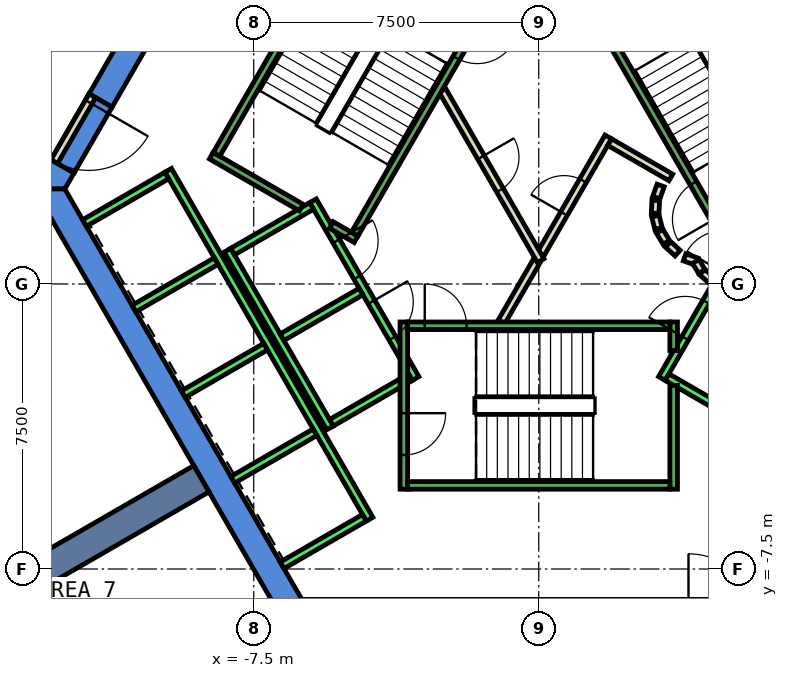
"""IFC4 building model, lengths in metres.
Left out: names, types, materials, properties, quantities, classifications, styles, units other than length and angle.
Written with IfcOpenShell. Run it as: python <this file> out.ifc"""

import sys

from ifc_helpers import new_model, si_unit, direction, frame, frame_2d, origin, place, context, subcontext, project, spatial, polyline, rectangle, outline, extrude, element, fill, save


model = new_model("IFC4")
c1 = context("Model", 3, precision=1e-05, world=origin(), true_north=direction((0.0, 1.0)))
c2 = subcontext(c1, "Body", "Model", "MODEL_VIEW")
j1 = project(units=[si_unit("LENGTHUNIT", "METRE"), si_unit("PLANEANGLEUNIT", "RADIAN")], contexts=[c1])
p1 = place(None, origin())
s1 = spatial("IfcSite", under=j1, at=p1, CompositionType="ELEMENT")
p2 = place(p1, origin())
s2 = spatial("IfcBuilding", under=s1, at=p2, CompositionType="ELEMENT")
p3 = place(p2, frame((0.0, 0.0, 189.8)))
s3 = spatial("IfcBuildingStorey", under=s2, at=p3, CompositionType="ELEMENT", Elevation=189.8)
p4 = place(p3, frame((0.0, 0.0, -0.6)))
e1 = element("IfcWall", 1, at=p4, inside=s3, PredefinedType="SHEAR", context=c2, shape_type="SweptSolid", body=[
    extrude(outline(polyline([(-11.834, 5.002), (-11.228, 4.652), (-6.235, 13.3), (-6.64, 14.0), (-11.834, 5.002)])), origin(), (0.0, 0.0, 1.0), 4.4),
])
p5 = place(p3, frame((0.0, 0.0, -0.6)))
e2 = element("IfcWall", 2, at=p5, inside=s3, PredefinedType="SHEAR", context=c2, shape_type="SweptSolid", body=[
    extrude(outline(polyline([(-12.228, 2.92), (-12.834, 3.27), (-13.279, 2.5), (-12.471, 2.5), (-12.228, 2.92)])), origin(), (0.0, 0.0, 1.0), 4.4),
])
p6 = place(p3, frame((0.0, 0.0, 3.6)))
e3 = element("IfcWall", 3, at=p6, inside=s3, PredefinedType="SHEAR", context=c2, shape_type="SweptSolid", body=[
    extrude(outline(polyline([(-12.834, 3.27), (-12.228, 2.92), (-11.228, 4.652), (-11.834, 5.002), (-12.834, 3.27)])), origin(), (0.0, 0.0, 1.0), 0.2),
])
p7 = place(p3, frame((0.0, 0.0, -0.6)))
e4 = element("IfcWall", 4, at=p7, inside=s3, PredefinedType="SHEAR", context=c2, shape_type="SweptSolid", body=[
    extrude(outline(polyline([(-13.279, 2.5), (-6.64, -9.0), (-6.235, -8.3), (-12.471, 2.5), (-13.279, 2.5)])), origin(), (0.0, 0.0, 1.0), 4.4),
])
p8 = place(p3, frame((-8.877, -5.125, -0.6), z_axis=(0.0, 0.0, 1.0), x_axis=(-0.866017533419, -0.500013631625, 0.0)))
e5 = element("IfcWall", 5, at=p8, inside=s3, PredefinedType="SHEAR", context=c2, shape_type="SweptSolid", body=[
    extrude(rectangle(XDim=9.0, YDim=0.8, at=frame_2d((4.5, 0.0))), origin(), (0.0, 0.0, 1.0), 4.4),
])
p9 = place(p3, frame((-15.905, 4.412, 0.0), z_axis=(0.0, 0.0, 1.0), x_axis=(0.5000098125, 0.866019738461, 0.0)))
e6 = element("IfcWall", 6, at=p9, inside=s3, PredefinedType="PARTITIONING", context=c2, shape_type="SweptSolid", body=[
    extrude(rectangle(XDim=8.188, YDim=0.2, at=frame_2d((4.094, 0.0))), origin(), (0.0, 0.0, 1.0), 3.8),
])
p10 = place(p9, frame((3.594, 0.0, 0.0)))
e7 = element("IfcOpeningElement", 7, at=p10, cuts=e6, PredefinedType="OPENING", context=c2, shape_type="SweptSolid", body=[
    extrude(rectangle(XDim=1.0, YDim=2.1, at=frame_2d((0.5, 1.05))), frame((0.0, 0.11, 0.0), z_axis=(0.0, -1.0, 0.0), x_axis=(1.0, 0.0, 0.0)), (0.0, 0.0, 1.0), 0.22),
])
p11 = place(p3, frame((-0.982, -1.0, 0.0), z_axis=(0.0, 0.0, 1.0), x_axis=(0.50024047865, 0.865886518847, 0.0)))
e8 = element("IfcWall", 8, at=p11, inside=s3, PredefinedType="PARTITIONING", context=c2, shape_type="SweptSolid", body=[
    extrude(rectangle(XDim=1.863, YDim=0.2, at=frame_2d((0.931, 0.0))), origin(), (0.0, 0.0, 1.0), 3.8),
])
p12 = place(p3, frame((0.05, 0.787, 0.0), z_axis=(0.0, 0.0, 1.0), x_axis=(0.499954076797, 0.866051915934, 0.0)))
e9 = element("IfcWall", 9, at=p12, inside=s3, PredefinedType="PARTITIONING", context=c2, shape_type="SweptSolid", body=[
    extrude(rectangle(XDim=3.558, YDim=0.2, at=frame_2d((1.779, 0.0))), origin(), (0.0, 0.0, 1.0), 3.8),
])
p13 = place(p12, frame((1.229, 0.0, 0.0)))
e10 = element("IfcOpeningElement", 10, at=p13, cuts=e9, PredefinedType="OPENING", context=c2, shape_type="SweptSolid", body=[
    extrude(rectangle(XDim=1.0, YDim=2.1, at=frame_2d((0.5, 1.05))), frame((0.0, 0.11, 0.0), z_axis=(0.0, -1.0, 0.0), x_axis=(1.0, 0.0, 0.0)), (0.0, 0.0, 1.0), 0.22),
])
p14 = place(p3, frame((1.866, 3.732, 0.0), z_axis=(0.0, 0.0, 1.0), x_axis=(0.866043361281, -0.499968895414, 0.0)))
e11 = element("IfcWall", 11, at=p14, inside=s3, PredefinedType="PARTITIONING", context=c2, shape_type="SweptSolid", body=[
    extrude(rectangle(XDim=1.858, YDim=0.2, at=frame_2d((0.929, 0.0))), origin(), (0.0, 0.0, 1.0), 3.8),
])
p15 = place(p3, frame((3.208, 2.592, 0.0), z_axis=(0.0, 0.0, 1.0), x_axis=(-0.337388820924, -0.941365382578, 0.0)))
e12 = element("IfcWall", 12, at=p15, inside=s3, PredefinedType="PARTITIONING", context=c2, shape_type="SweptSolid", body=[
    extrude(rectangle(XDim=0.338, YDim=0.2, at=frame_2d((0.169, 0.0))), origin(), (0.0, 0.0, 1.0), 3.8),
])
p16 = place(p3, frame((3.079, 2.199, 0.0), z_axis=(0.0, 0.0, 1.0), x_axis=(-0.047771483479, -0.998858290933, 0.0)))
e13 = element("IfcWall", 13, at=p16, inside=s3, PredefinedType="PARTITIONING", context=c2, shape_type="SweptSolid", body=[
    extrude(rectangle(XDim=0.337, YDim=0.2, at=frame_2d((0.169, 0.0))), origin(), (0.0, 0.0, 1.0), 3.8),
])
p17 = place(p3, frame((3.07, 1.786, 0.0), z_axis=(0.0, 0.0, 1.0), x_axis=(0.242705583207, -0.970099994784, 0.0)))
e14 = element("IfcWall", 14, at=p17, inside=s3, PredefinedType="PARTITIONING", context=c2, shape_type="SweptSolid", body=[
    extrude(rectangle(XDim=0.338, YDim=0.2, at=frame_2d((0.169, 0.0))), origin(), (0.0, 0.0, 1.0), 3.8),
])
for number, where, z_axis, x_axis in (
    (15, (3.182, 1.388, 0.0), (0.0, 0.0, 1.0), (0.512, -0.859, 0.0)),
    (16, (3.404, 1.039, 0.0), (0.0, 0.0, 1.0), (0.74, -0.672, 0.0)),
):
    element("IfcWall", number, at=place(p3, frame(where, z_axis=z_axis, x_axis=x_axis)), inside=s3, PredefinedType="PARTITIONING", context=c2, shape_type="SweptSolid", body=[
        extrude(rectangle(XDim=0.338, YDim=0.2, at=frame_2d((0.169, 0.0))), origin(), (0.0, 0.0, 1.0), 3.8),
    ])
p18 = place(p3, frame((3.838, 0.702, 0.0), z_axis=(0.0, 0.0, 1.0), x_axis=(0.941035081519, -0.338308993895, 0.0)))
e17 = element("IfcWall", 17, at=p18, inside=s3, PredefinedType="PARTITIONING", context=c2, shape_type="SweptSolid", body=[
    extrude(rectangle(XDim=0.337, YDim=0.2, at=frame_2d((0.168, 0.0))), origin(), (0.0, 0.0, 1.0), 3.8),
])
p19 = place(p3, frame((4.132, 0.593, 0.0), z_axis=(0.0, 0.0, 1.0), x_axis=(0.513561617048, -0.858052717201, 0.0)))
e18 = element("IfcWall", 18, at=p19, inside=s3, PredefinedType="PARTITIONING", context=c2, shape_type="SweptSolid", body=[
    extrude(rectangle(XDim=0.308, YDim=0.2, at=frame_2d((0.154, 0.0))), origin(), (0.0, 0.0, 1.0), 3.8),
])
p20 = place(p3, frame((4.301, 0.315, 0.0), z_axis=(0.0, 0.0, 1.0), x_axis=(0.741798017506, -0.670623367639, 0.0)))
e19 = element("IfcWall", 19, at=p20, inside=s3, PredefinedType="PARTITIONING", context=c2, shape_type="SweptSolid", body=[
    extrude(rectangle(XDim=0.309, YDim=0.2, at=frame_2d((0.154, 0.0))), origin(), (0.0, 0.0, 1.0), 3.8),
])
p21 = place(p3, frame((-2.54, 5.1, 0.0), z_axis=(0.0, 0.0, 1.0), x_axis=(0.499925051871, -0.866068670783, 0.0)))
e20 = element("IfcWall", 20, at=p21, inside=s3, PredefinedType="PARTITIONING", context=c2, shape_type="SweptSolid", body=[
    extrude(rectangle(XDim=5.181, YDim=0.2, at=frame_2d((2.59, 0.0))), origin(), (0.0, 0.0, 1.0), 3.8),
])
p22 = place(p21, frame((2.04, 0.0, 0.0)))
e21 = element("IfcOpeningElement", 21, at=p22, cuts=e20, PredefinedType="OPENING", context=c2, shape_type="SweptSolid", body=[
    extrude(rectangle(XDim=1.0, YDim=2.1, at=frame_2d((0.5, 1.05))), frame((0.0, 0.11, 0.0), z_axis=(0.0, -1.0, 0.0), x_axis=(1.0, 0.0, 0.0)), (0.0, 0.0, 1.0), 0.22),
])
p23 = place(p3, frame((-11.747, 4.952, 0.0), z_axis=(0.0, 0.0, 1.0), x_axis=(-0.50002537861, -0.866010750942, 0.0)))
e22 = element("IfcWall", 22, at=p23, inside=s3, PredefinedType="PARTITIONING", context=c2, shape_type="SweptSolid", body=[
    extrude(rectangle(XDim=2.0, YDim=0.2, at=frame_2d((1.0, 0.0))), origin(), (0.0, 0.0, 1.0), 2.4),
])
p24 = place(p23, frame((0.19, 0.0, 0.0)))
e23 = element("IfcOpeningElement", 23, at=p24, cuts=e22, PredefinedType="OPENING", context=c2, shape_type="SweptSolid", body=[
    extrude(rectangle(XDim=1.8, YDim=2.1, at=frame_2d((0.9, 1.05))), frame((0.0, 0.11, 0.0), z_axis=(0.0, -1.0, 0.0), x_axis=(1.0, 0.0, 0.0)), (0.0, 0.0, 1.0), 0.22),
])
p25 = place(p3, frame((-5.94, 2.188, 0.0), z_axis=(0.0, 0.0, 1.0), x_axis=(0.500034260056, -0.866005622828, 0.0)))
e24 = element("IfcWall", 24, at=p25, inside=s3, PredefinedType="STANDARD", context=c2, shape_type="SweptSolid", body=[
    extrude(rectangle(XDim=5.399, YDim=0.2, at=frame_2d((2.7, 0.0))), origin(), (0.0, 0.0, 1.0), 3.8),
])
p26 = place(p25, frame((3.075, 0.0, 0.0)))
e25 = element("IfcOpeningElement", 25, at=p26, cuts=e24, PredefinedType="OPENING", context=c2, shape_type="SweptSolid", body=[
    extrude(rectangle(XDim=1.1, YDim=2.1, at=frame_2d((0.55, 1.05))), frame((0.0, 0.11, 0.0), z_axis=(0.0, -1.0, 0.0), x_axis=(1.0, 0.0, 0.0)), (0.0, 0.0, 1.0), 0.22),
])
p27 = place(p25, frame((1.225, 0.0, 0.0)))
e26 = element("IfcOpeningElement", 26, at=p27, cuts=e24, PredefinedType="OPENING", context=c2, shape_type="SweptSolid", body=[
    extrude(rectangle(XDim=1.1, YDim=2.1, at=frame_2d((0.55, 1.05))), frame((0.0, 0.11, 0.0), z_axis=(0.0, -1.0, 0.0), x_axis=(1.0, 0.0, 0.0)), (0.0, 0.0, 1.0), 0.22),
])
p28 = place(p3, frame((-8.192, 0.888, 0.0), z_axis=(0.0, 0.0, 1.0), x_axis=(0.500034260056, -0.866005622828, 0.0)))
e27 = element("IfcWall", 27, at=p28, inside=s3, PredefinedType="STANDARD", context=c2, shape_type="SweptSolid", body=[
    extrude(rectangle(XDim=5.399, YDim=0.2, at=frame_2d((2.7, 0.0))), origin(), (0.0, 0.0, 1.0), 3.8),
])
for number, where, z_axis, x_axis in (
    (28, (-5.977, 2.052, 0.0), (0.0, 0.0, 1.0), (-0.866, -0.5, 0.0)),
    (29, (-4.677, -0.2, 0.0), (0.0, 0.0, 1.0), (-0.866, -0.5, 0.0)),
):
    element("IfcWall", number, at=place(p3, frame(where, z_axis=z_axis, x_axis=x_axis)), inside=s3, PredefinedType="STANDARD", context=c2, shape_type="SweptSolid", body=[
        extrude(rectangle(XDim=2.399, YDim=0.2, at=frame_2d((1.2, 0.0))), origin(), (0.0, 0.0, 1.0), 3.8),
    ])
p29 = place(p3, frame((-3.377, -2.452, 0.0), z_axis=(0.0, 0.0, 1.0), x_axis=(-0.865955154139, -0.50012165622, 0.0)))
e30 = element("IfcWall", 30, at=p29, inside=s3, PredefinedType="STANDARD", context=c2, shape_type="SweptSolid", body=[
    extrude(rectangle(XDim=2.4, YDim=0.2, at=frame_2d((1.2, 0.0))), origin(), (0.0, 0.0, 1.0), 3.8),
])
p30 = place(p3, frame((-9.751, 2.99, 0.0), z_axis=(0.0, 0.0, 1.0), x_axis=(0.50000090737, -0.866024879913, 0.0)))
e31 = element("IfcWall", 31, at=p30, inside=s3, PredefinedType="STANDARD", context=c2, shape_type="SweptSolid", body=[
    extrude(rectangle(XDim=10.6, YDim=0.2, at=frame_2d((5.3, 0.0))), origin(), (0.0, 0.0, 1.0), 3.8),
])
p31 = place(p3, frame((-9.788, 2.853, 0.0), z_axis=(0.0, 0.0, 1.0), x_axis=(-0.865998541277, -0.500046524342, 0.0)))
e32 = element("IfcWall", 32, at=p31, inside=s3, PredefinedType="STANDARD", context=c2, shape_type="SweptSolid", body=[
    extrude(rectangle(XDim=2.5, YDim=0.2, at=frame_2d((1.25, 0.0))), origin(), (0.0, 0.0, 1.0), 3.8),
])
for number, where, z_axis, x_axis in (
    (33, (-8.488, 0.602, 0.0), (0.0, 0.0, 1.0), (-0.866, -0.5, 0.0)),
    (34, (-7.188, -1.65, 0.0), (0.0, 0.0, 1.0), (-0.866, -0.5, 0.0)),
    (35, (-5.888, -3.902, 0.0), (0.0, 0.0, 1.0), (-0.866, -0.5, 0.0)),
    (36, (-4.588, -6.153, 0.0), (0.0, 0.0, 1.0), (-0.866, -0.5, 0.0)),
):
    element("IfcWall", number, at=place(p3, frame(where, z_axis=z_axis, x_axis=x_axis)), inside=s3, PredefinedType="STANDARD", context=c2, shape_type="SweptSolid", body=[
        extrude(rectangle(XDim=2.5, YDim=0.2, at=frame_2d((1.25, 0.0))), origin(), (0.0, 0.0, 1.0), 3.8),
    ])
p32 = place(p3, frame((3.24, -2.488, 0.0), z_axis=(0.0, 0.0, 1.0), x_axis=(0.500034260056, 0.866005622828, 0.0)))
e37 = element("IfcWall", 37, at=p32, inside=s3, PredefinedType="STANDARD", context=c2, shape_type="SweptSolid", body=[
    extrude(rectangle(XDim=5.399, YDim=0.2, at=frame_2d((2.7, 0.0))), origin(), (0.0, 0.0, 1.0), 3.8),
])
p33 = place(p32, frame((3.225, 0.0, 0.0)))
e38 = element("IfcOpeningElement", 38, at=p33, cuts=e37, PredefinedType="OPENING", context=c2, shape_type="SweptSolid", body=[
    extrude(rectangle(XDim=1.1, YDim=2.1, at=frame_2d((0.55, 1.05))), frame((0.0, 0.11, 0.0), z_axis=(0.0, -1.0, 0.0), x_axis=(1.0, 0.0, 0.0)), (0.0, 0.0, 1.0), 0.22),
])
p34 = place(p32, frame((1.225, 0.0, 0.0)))
e39 = element("IfcOpeningElement", 39, at=p34, cuts=e37, PredefinedType="OPENING", context=c2, shape_type="SweptSolid", body=[
    extrude(rectangle(XDim=1.1, YDim=2.1, at=frame_2d((0.55, 1.05))), frame((0.0, 0.11, 0.0), z_axis=(0.0, -1.0, 0.0), x_axis=(1.0, 0.0, 0.0)), (0.0, 0.0, 1.0), 0.22),
])
p35 = place(p3, frame((3.377, -2.452, 0.0), z_axis=(0.0, 0.0, 1.0), x_axis=(0.865955154139, -0.50012165622, 0.0)))
e40 = element("IfcWall", 40, at=p35, inside=s3, PredefinedType="STANDARD", context=c2, shape_type="SweptSolid", body=[
    extrude(rectangle(XDim=2.4, YDim=0.2, at=frame_2d((1.2, 0.0))), origin(), (0.0, 0.0, 1.0), 3.8),
])
p36 = place(p3, frame((-3.55, -1.0, 0.0), z_axis=(0.0, 0.0, 1.0), x_axis=(0.0, -1.0, 0.0)))
e41 = element("IfcWall", 41, at=p36, inside=s3, PredefinedType="STANDARD", context=c2, shape_type="SweptSolid", body=[
    extrude(rectangle(XDim=4.4, YDim=0.2, at=frame_2d((2.2, 0.0))), origin(), (0.0, 0.0, 1.0), 3.8),
])
p37 = place(p36, frame((2.4, 0.0, 0.0)))
e42 = element("IfcOpeningElement", 42, at=p37, cuts=e41, PredefinedType="OPENING", context=c2, shape_type="SweptSolid", body=[
    extrude(rectangle(XDim=1.1, YDim=2.2, at=frame_2d((0.55, 1.1))), frame((0.0, 0.11, 0.0), z_axis=(0.0, -1.0, 0.0), x_axis=(1.0, 0.0, 0.0)), (0.0, 0.0, 1.0), 0.22),
])
p38 = place(p3, frame((3.55, -2.667, 0.0), z_axis=(0.0, 0.0, 1.0), x_axis=(0.0, -1.0, 0.0)))
e43 = element("IfcWall", 43, at=p38, inside=s3, PredefinedType="STANDARD", context=c2, shape_type="SweptSolid", body=[
    extrude(rectangle(XDim=2.733, YDim=0.2, at=frame_2d((1.366, 0.0))), origin(), (0.0, 0.0, 1.0), 3.8),
])
p39 = place(p3, frame((3.55, -1.0, 0.0), z_axis=(0.0, 0.0, 1.0), x_axis=(0.0, -1.0, 0.0)))
e44 = element("IfcWall", 44, at=p39, inside=s3, PredefinedType="STANDARD", context=c2, shape_type="SweptSolid", body=[
    extrude(rectangle(XDim=0.751, YDim=0.2, at=frame_2d((0.375, 0.0))), origin(), (0.0, 0.0, 1.0), 3.8),
])
p40 = place(p3, frame((-3.45, -1.1, 0.0), z_axis=(0.0, 0.0, 1.0), x_axis=(1.0, 0.0, 0.0)))
e45 = element("IfcWall", 45, at=p40, inside=s3, PredefinedType="STANDARD", context=c2, shape_type="SweptSolid", body=[
    extrude(rectangle(XDim=6.9, YDim=0.2, at=frame_2d((3.45, 0.0))), origin(), (0.0, 0.0, 1.0), 3.8),
])
p41 = place(p40, frame((0.45, 0.0, 0.0)))
e46 = element("IfcOpeningElement", 46, at=p41, cuts=e45, PredefinedType="OPENING", context=c2, shape_type="SweptSolid", body=[
    extrude(rectangle(XDim=1.1, YDim=2.2, at=frame_2d((0.55, 1.1))), frame((0.0, 0.11, 0.0), z_axis=(0.0, -1.0, 0.0), x_axis=(1.0, 0.0, 0.0)), (0.0, 0.0, 1.0), 0.22),
])
p42 = place(p3, frame((-3.45, -5.3, 0.0), z_axis=(0.0, 0.0, 1.0), x_axis=(1.0, 0.0, 0.0)))
e47 = element("IfcWall", 47, at=p42, inside=s3, PredefinedType="STANDARD", context=c2, shape_type="SweptSolid", body=[
    extrude(rectangle(XDim=6.9, YDim=0.2, at=frame_2d((3.45, 0.0))), origin(), (0.0, 0.0, 1.0), 3.8),
])
p43 = place(p3, frame((4.843, 1.312, 0.0), z_axis=(0.0, 0.0, 1.0), x_axis=(-0.499963383562, 0.866046543262, 0.0)))
e48 = element("IfcWall", 48, at=p43, inside=s3, PredefinedType="STANDARD", context=c2, shape_type="SweptSolid", body=[
    extrude(rectangle(XDim=6.9, YDim=0.2, at=frame_2d((3.45, 0.0))), origin(), (0.0, 0.0, 1.0), 3.8),
])
p44 = place(p43, frame((0.45, 0.0, 0.0)))
e49 = element("IfcOpeningElement", 49, at=p44, cuts=e48, PredefinedType="OPENING", context=c2, shape_type="SweptSolid", body=[
    extrude(rectangle(XDim=1.1, YDim=2.2, at=frame_2d((0.55, 1.1))), frame((0.0, 0.11, 0.0), z_axis=(0.0, -1.0, 0.0), x_axis=(1.0, 0.0, 0.0)), (0.0, 0.0, 1.0), 0.22),
])
p45 = place(p3, frame((-6.25, 2.01, 0.0), z_axis=(0.0, 0.0, 1.0), x_axis=(-0.86611865017, 0.499838457731, 0.0)))
e50 = element("IfcWall", 50, at=p45, inside=s3, PredefinedType="STANDARD", context=c2, shape_type="SweptSolid", body=[
    extrude(rectangle(XDim=2.733, YDim=0.2, at=frame_2d((1.366, 0.0))), origin(), (0.0, 0.0, 1.0), 3.8),
])
p46 = place(p3, frame((-4.806, 1.176, 0.0), z_axis=(0.0, 0.0, 1.0), x_axis=(-0.866558586415, 0.499075361355, 0.0)))
e51 = element("IfcWall", 51, at=p46, inside=s3, PredefinedType="STANDARD", context=c2, shape_type="SweptSolid", body=[
    extrude(rectangle(XDim=0.751, YDim=0.2, at=frame_2d((0.376, 0.0))), origin(), (0.0, 0.0, 1.0), 3.8),
])
p47 = place(p3, frame((-1.393, 7.288, 0.0), z_axis=(0.0, 0.0, 1.0), x_axis=(-0.499963383562, -0.866046543262, 0.0)))
e52 = element("IfcWall", 52, at=p47, inside=s3, PredefinedType="STANDARD", context=c2, shape_type="SweptSolid", body=[
    extrude(rectangle(XDim=6.9, YDim=0.2, at=frame_2d((3.45, 0.0))), origin(), (0.0, 0.0, 1.0), 3.8),
])
p48 = place(p47, frame((0.45, 0.0, 0.0)))
e53 = element("IfcOpeningElement", 53, at=p48, cuts=e52, PredefinedType="OPENING", context=c2, shape_type="SweptSolid", body=[
    extrude(rectangle(XDim=1.1, YDim=2.2, at=frame_2d((0.55, 1.1))), frame((0.0, 0.11, 0.0), z_axis=(0.0, -1.0, 0.0), x_axis=(1.0, 0.0, 0.0)), (0.0, 0.0, 1.0), 0.22),
])
p49 = place(p3, frame((-5.03, 9.388, 0.0), z_axis=(0.0, 0.0, 1.0), x_axis=(-0.499978703459, -0.866037698999, 0.0)))
e54 = element("IfcWall", 54, at=p49, inside=s3, PredefinedType="STANDARD", context=c2, shape_type="SweptSolid", body=[
    extrude(rectangle(XDim=6.9, YDim=0.2, at=frame_2d((3.45, 0.0))), origin(), (0.0, 0.0, 1.0), 3.8),
])
p50 = place(p13, origin())
e55 = element("IfcDoor", 55, at=p50, inside=s3, OperationType="SINGLE_SWING_RIGHT", PredefinedType="DOOR", context=c2, shape_type="SweptSolid", body=[
    extrude(rectangle(XDim=1.0, YDim=2.1, at=frame_2d((0.5, 1.05))), frame((0.0, 0.025, 0.0), z_axis=(0.0, -1.0, 0.0), x_axis=(1.0, 0.0, 0.0)), (0.0, 0.0, 1.0), 0.05),
])
fill(e10, e55)
p51 = place(p22, origin())
e56 = element("IfcDoor", 56, at=p51, inside=s3, OperationType="SINGLE_SWING_RIGHT", PredefinedType="DOOR", context=c2, shape_type="SweptSolid", body=[
    extrude(rectangle(XDim=1.0, YDim=2.1, at=frame_2d((0.5, 1.05))), frame((0.0, 0.025, 0.0), z_axis=(0.0, -1.0, 0.0), x_axis=(1.0, 0.0, 0.0)), (0.0, 0.0, 1.0), 0.05),
])
fill(e21, e56)
p52 = place(p24, origin())
e57 = element("IfcDoor", 57, at=p52, inside=s3, OperationType="DOUBLE_DOOR_SINGLE_SWING", PredefinedType="DOOR", context=c2, shape_type="SweptSolid", body=[
    extrude(rectangle(XDim=1.8, YDim=2.1, at=frame_2d((0.9, 1.05))), frame((0.0, 0.025, 0.0), z_axis=(0.0, -1.0, 0.0), x_axis=(1.0, 0.0, 0.0)), (0.0, 0.0, 1.0), 0.05),
])
fill(e23, e57)
p53 = place(p26, origin())
e58 = element("IfcDoor", 58, at=p53, inside=s3, OperationType="SLIDING_TO_LEFT", PredefinedType="DOOR", context=c2, shape_type="SweptSolid", body=[
    extrude(rectangle(XDim=1.1, YDim=2.1, at=frame_2d((0.55, 1.05))), frame((0.0, 0.025, 0.0), z_axis=(0.0, -1.0, 0.0), x_axis=(1.0, 0.0, 0.0)), (0.0, 0.0, 1.0), 0.05),
])
fill(e25, e58)
p54 = place(p34, origin())
e59 = element("IfcDoor", 59, at=p54, inside=s3, OperationType="SLIDING_TO_LEFT", PredefinedType="DOOR", context=c2, shape_type="SweptSolid", body=[
    extrude(rectangle(XDim=1.1, YDim=2.1, at=frame_2d((0.55, 1.05))), frame((0.0, 0.025, 0.0), z_axis=(0.0, -1.0, 0.0), x_axis=(1.0, 0.0, 0.0)), (0.0, 0.0, 1.0), 0.05),
])
fill(e39, e59)
p55 = place(p27, origin())
e60 = element("IfcDoor", 60, at=p55, inside=s3, OperationType="SLIDING_TO_LEFT", PredefinedType="DOOR", context=c2, shape_type="SweptSolid", body=[
    extrude(rectangle(XDim=1.1, YDim=2.1, at=frame_2d((0.55, 1.05))), frame((0.0, 0.025, 0.0), z_axis=(0.0, -1.0, 0.0), x_axis=(1.0, 0.0, 0.0)), (0.0, 0.0, 1.0), 0.05),
])
fill(e26, e60)
p56 = place(p41, origin())
e61 = element("IfcDoor", 61, at=p56, inside=s3, OperationType="SINGLE_SWING_LEFT", PredefinedType="DOOR", context=c2, shape_type="SweptSolid", body=[
    extrude(rectangle(XDim=1.1, YDim=2.2, at=frame_2d((0.55, 1.1))), frame((0.0, 0.025, 0.0), z_axis=(0.0, -1.0, 0.0), x_axis=(1.0, 0.0, 0.0)), (0.0, 0.0, 1.0), 0.05),
])
fill(e46, e61)
p57 = place(p37, origin())
e62 = element("IfcDoor", 62, at=p57, inside=s3, OperationType="SINGLE_SWING_LEFT", PredefinedType="DOOR", context=c2, shape_type="SweptSolid", body=[
    extrude(rectangle(XDim=1.1, YDim=2.2, at=frame_2d((0.55, 1.1))), frame((0.0, 0.025, 0.0), z_axis=(0.0, -1.0, 0.0), x_axis=(1.0, 0.0, 0.0)), (0.0, 0.0, 1.0), 0.05),
])
fill(e42, e62)
p58 = place(p44, origin())
e63 = element("IfcDoor", 63, at=p58, inside=s3, OperationType="SINGLE_SWING_LEFT", PredefinedType="DOOR", context=c2, shape_type="SweptSolid", body=[
    extrude(rectangle(XDim=1.1, YDim=2.2, at=frame_2d((0.55, 1.1))), frame((0.0, 0.025, 0.0), z_axis=(0.0, -1.0, 0.0), x_axis=(1.0, 0.0, 0.0)), (0.0, 0.0, 1.0), 0.05),
])
fill(e49, e63)
p59 = place(p48, origin())
e64 = element("IfcDoor", 64, at=p59, inside=s3, OperationType="SINGLE_SWING_LEFT", PredefinedType="DOOR", context=c2, shape_type="SweptSolid", body=[
    extrude(rectangle(XDim=1.1, YDim=2.2, at=frame_2d((0.55, 1.1))), frame((0.0, 0.025, 0.0), z_axis=(0.0, -1.0, 0.0), x_axis=(1.0, 0.0, 0.0)), (0.0, 0.0, 1.0), 0.05),
])
fill(e53, e64)
save(model, sys.argv[1])
